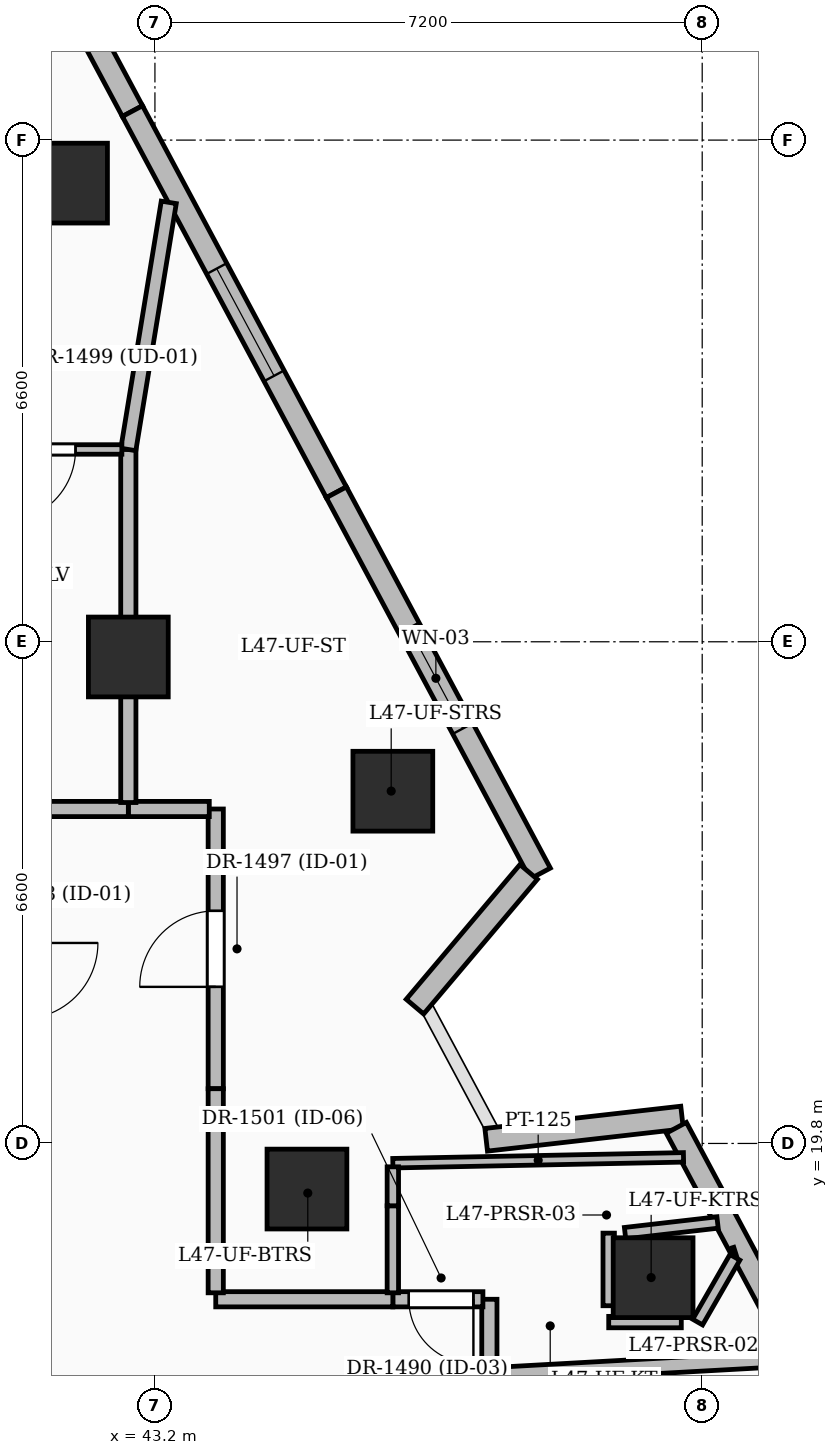
"""IFC4 building model, lengths in metres.
Left out: names, types, materials, properties, quantities, classifications, styles, units other than length and angle.
Written with IfcOpenShell. Run it as: python <this file> out.ifc"""

import sys

from ifc_helpers import new_model, si_unit, direction, frame, frame_2d, origin, origin_2d, place, context, subcontext, project, spatial, rectangle, extrude, element, fill, save


model = new_model("IFC4")
c1 = context("Model", 3, precision=1e-05, world=origin(), true_north=direction((0.0, 1.0)))
c2 = subcontext(c1, "Body", "Model", "MODEL_VIEW")
j1 = project(units=[si_unit("LENGTHUNIT", "METRE"), si_unit("PLANEANGLEUNIT", "RADIAN")], contexts=[c1])
p1 = place(None, origin())
s1 = spatial("IfcSite", under=j1, at=p1, CompositionType="ELEMENT")
p2 = place(p1, origin())
s2 = spatial("IfcBuilding", under=s1, at=p2, CompositionType="ELEMENT")
p3 = place(p2, frame((0.0, 0.0, 182.4)))
s3 = spatial("IfcBuildingStorey", under=s2, at=p3, CompositionType="ELEMENT", Elevation=182.4)
for number, where, z_axis, x_axis in (
    (1, (45.2, 19.2, 0.0), (0.0, 0.0, 1.0), (1.0, 0.0, 0.0)),
    (2, (42.85, 26.2, 0.0), (0.0, 0.0, 1.0), (1.0, 0.0, 0.0)),
    (3, (49.754, 18.034, 0.0), (0.0, 0.0, 1.0), (1.0, 0.0, 0.0)),
    (4, (46.33, 24.434, 0.0), (0.0, 0.0, 1.0), (1.0, 0.0, 0.0)),
    (5, (42.05, 32.434, 0.0), (0.0, 0.0, 1.0), (1.0, 0.0, 0.0)),
):
    element("IfcColumn", number, at=place(p3, frame(where, z_axis=z_axis, x_axis=x_axis)), inside=s3, PredefinedType="COLUMN", context=c2, shape_type="SweptSolid", body=[
        extrude(rectangle(XDim=1.05, YDim=1.05, at=origin_2d()), origin(), (0.0, 0.0, 1.0), 3.6),
    ])
p4 = place(p3, frame((40.497, 37.881, 0.0), z_axis=(0.0, 0.0, 1.0), x_axis=(0.47173271257, -0.881741599274, 0.0)))
e6 = element("IfcWall", 6, at=p4, inside=s3, PredefinedType="SOLIDWALL", context=c2, shape_type="SweptSolid", body=[
    extrude(rectangle(XDim=5.103, YDim=0.3, at=frame_2d((2.551, 0.0))), origin(), (0.0, 0.0, 1.0), 3.35),
])
p5 = place(p4, frame((1.79, 0.0, 0.6)))
e7 = element("IfcOpeningElement", 7, at=p5, cuts=e6, PredefinedType="OPENING", context=c2, shape_type="SweptSolid", body=[
    extrude(rectangle(XDim=1.8, YDim=2.1, at=frame_2d((0.9, 1.05))), frame((0.0, 0.16, 0.0), z_axis=(0.0, -1.0, 0.0), x_axis=(1.0, 0.0, 0.0)), (0.0, 0.0, 1.0), 0.32),
])
p6 = place(p3, frame((42.904, 33.382, 0.0), z_axis=(0.0, 0.0, 1.0), x_axis=(0.4716995968, -0.881759315448, 0.0)))
e8 = element("IfcWall", 8, at=p6, inside=s3, PredefinedType="SOLIDWALL", context=c2, shape_type="SweptSolid", body=[
    extrude(rectangle(XDim=5.688, YDim=0.3, at=frame_2d((2.844, 0.0))), origin(), (0.0, 0.0, 1.0), 3.35),
])
p7 = place(p6, frame((2.35, 0.0, 0.55)))
e9 = element("IfcOpeningElement", 9, at=p7, cuts=e8, PredefinedType="OPENING", context=c2, shape_type="SweptSolid", body=[
    extrude(rectangle(XDim=1.6, YDim=2.2, at=frame_2d((0.8, 1.1))), frame((0.0, 0.16, 0.0), z_axis=(0.0, -1.0, 0.0), x_axis=(1.0, 0.0, 0.0)), (0.0, 0.0, 1.0), 0.32),
])
p8 = place(p3, frame((45.587, 28.366, 0.0), z_axis=(0.0, 0.0, 1.0), x_axis=(0.471750824323, -0.881731909228, 0.0)))
e10 = element("IfcWall", 10, at=p8, inside=s3, PredefinedType="SOLIDWALL", context=c2, shape_type="SweptSolid", body=[
    extrude(rectangle(XDim=5.688, YDim=0.3, at=frame_2d((2.844, 0.0))), origin(), (0.0, 0.0, 1.0), 3.35),
])
p9 = place(p8, frame((2.025, 0.0, 0.6)))
e11 = element("IfcOpeningElement", 11, at=p9, cuts=e10, PredefinedType="OPENING", context=c2, shape_type="SweptSolid", body=[
    extrude(rectangle(XDim=1.5, YDim=2.1, at=frame_2d((0.75, 1.05))), frame((0.0, 0.16, 0.0), z_axis=(0.0, -1.0, 0.0), x_axis=(1.0, 0.0, 0.0)), (0.0, 0.0, 1.0), 0.32),
])
p10 = place(p3, frame((48.117, 23.372, 0.0), z_axis=(0.0, 0.0, 1.0), x_axis=(-0.645234076177, -0.763984938949, 0.0)))
e12 = element("IfcWall", 12, at=p10, inside=s3, PredefinedType="SOLIDWALL", context=c2, shape_type="SweptSolid", body=[
    extrude(rectangle(XDim=2.319, YDim=0.3, at=frame_2d((1.16, 0.0))), origin(), (0.0, 0.0, 1.0), 2.575),
])
p11 = place(p3, frame((47.558, 19.848, 0.0), z_axis=(0.0, 0.0, 1.0), x_axis=(0.993611013473, 0.112859000109, 0.0)))
e13 = element("IfcWall", 13, at=p11, inside=s3, PredefinedType="SOLIDWALL", context=c2, shape_type="SweptSolid", body=[
    extrude(rectangle(XDim=2.594, YDim=0.3, at=frame_2d((1.297, 0.0))), origin(), (0.0, 0.0, 1.0), 2.575),
])
p12 = place(p3, frame((50.06, 20.006, 0.0), z_axis=(0.0, 0.0, 1.0), x_axis=(0.471725656125, -0.881745374444, 0.0)))
e14 = element("IfcWall", 14, at=p12, inside=s3, PredefinedType="SOLIDWALL", context=c2, shape_type="SweptSolid", body=[
    extrude(rectangle(XDim=5.413, YDim=0.3, at=frame_2d((2.706, 0.0))), origin(), (0.0, 0.0, 1.0), 3.35),
])
p13 = place(p3, frame((47.425, 14.2, 0.0), z_axis=(0.0, 0.0, 1.0), x_axis=(0.068484119878, 0.997652206595, 0.0)))
e15 = element("IfcWall", 15, at=p13, inside=s3, PredefinedType="PARTITIONING", context=c2, shape_type="SweptSolid", body=[
    extrude(rectangle(XDim=2.556, YDim=0.2, at=frame_2d((1.278, 0.0))), origin(), (0.0, 0.0, 1.0), 2.464),
])
p14 = place(p13, frame((1.172, 0.0, 0.0)))
e16 = element("IfcOpeningElement", 16, at=p14, cuts=e15, PredefinedType="OPENING", context=c2, shape_type="SweptSolid", body=[
    extrude(rectangle(XDim=0.9, YDim=2.1, at=frame_2d((0.45, 1.05))), frame((0.0, 0.11, 0.0), z_axis=(0.0, -1.0, 0.0), x_axis=(1.0, 0.0, 0.0)), (0.0, 0.0, 1.0), 0.22),
])
p15 = place(p3, frame((44.0, 20.52, 0.0), z_axis=(0.0, 0.0, 1.0), x_axis=(0.0, 1.0, 0.0)))
e17 = element("IfcWall", 17, at=p15, inside=s3, PredefinedType="PARTITIONING", context=c2, shape_type="SweptSolid", body=[
    extrude(rectangle(XDim=3.68, YDim=0.2, at=frame_2d((1.84, 0.0))), origin(), (0.0, 0.0, 1.0), 2.436),
])
p16 = place(p15, frame((1.34, 0.0, 0.0)))
e18 = element("IfcOpeningElement", 18, at=p16, cuts=e17, PredefinedType="OPENING", context=c2, shape_type="SweptSolid", body=[
    extrude(rectangle(XDim=1.0, YDim=2.2, at=frame_2d((0.5, 1.1))), frame((0.0, 0.11, 0.0), z_axis=(0.0, -1.0, 0.0), x_axis=(1.0, 0.0, 0.0)), (0.0, 0.0, 1.0), 0.22),
])
p17 = place(p3, frame((43.915, 24.2, 0.0), z_axis=(0.0, 0.0, 1.0), x_axis=(-1.0, 0.0, 0.0)))
e19 = element("IfcWall", 19, at=p17, inside=s3, PredefinedType="PARTITIONING", context=c2, shape_type="SweptSolid", body=[
    extrude(rectangle(XDim=1.065, YDim=0.2, at=frame_2d((0.532, 0.0))), origin(), (0.0, 0.0, 1.0), 2.436),
])
p18 = place(p3, frame((47.6, 16.75, 0.0), z_axis=(0.0, 0.0, 1.0), x_axis=(0.0, 1.0, 0.0)))
e20 = element("IfcWall", 20, at=p18, inside=s3, PredefinedType="PARTITIONING", context=c2, shape_type="SweptSolid", body=[
    extrude(rectangle(XDim=1.0, YDim=0.2, at=frame_2d((0.5, 0.0))), origin(), (0.0, 0.0, 1.0), 3.01),
])
p19 = place(p3, frame((47.515, 17.75, 0.0), z_axis=(0.0, 0.0, 1.0), x_axis=(-1.0, 0.0, 0.0)))
e21 = element("IfcWall", 21, at=p19, inside=s3, PredefinedType="PARTITIONING", context=c2, shape_type="SweptSolid", body=[
    extrude(rectangle(XDim=1.185, YDim=0.2, at=frame_2d((0.592, 0.0))), origin(), (0.0, 0.0, 1.0), 3.01),
])
p20 = place(p19, frame((0.125, 0.0, 0.0)))
e22 = element("IfcOpeningElement", 22, at=p20, cuts=e21, PredefinedType="OPENING", context=c2, shape_type="SweptSolid", body=[
    extrude(rectangle(XDim=0.85, YDim=2.1, at=frame_2d((0.425, 1.05))), frame((0.0, 0.11, 0.0), z_axis=(0.0, -1.0, 0.0), x_axis=(1.0, 0.0, 0.0)), (0.0, 0.0, 1.0), 0.22),
])
p21 = place(p3, frame((46.33, 17.75, 0.0), z_axis=(0.0, 0.0, 1.0), x_axis=(-1.0, 0.0, 0.0)))
e23 = element("IfcWall", 23, at=p21, inside=s3, PredefinedType="PARTITIONING", context=c2, shape_type="SweptSolid", body=[
    extrude(rectangle(XDim=2.33, YDim=0.2, at=frame_2d((1.165, 0.0))), origin(), (0.0, 0.0, 1.0), 2.436),
])
p22 = place(p3, frame((42.85, 24.2, 0.0), z_axis=(0.0, 0.0, 1.0), x_axis=(-1.0, 0.0, 0.0)))
e24 = element("IfcWall", 24, at=p22, inside=s3, PredefinedType="PARTITIONING", context=c2, shape_type="SweptSolid", body=[
    extrude(rectangle(XDim=1.4, YDim=0.2, at=frame_2d((0.7, 0.0))), origin(), (0.0, 0.0, 1.0), 3.35),
])
p23 = place(p3, frame((51.551, 16.969, 0.0), z_axis=(0.0, 0.0, 1.0), x_axis=(-0.998463068017, -0.055421131396, 0.0)))
e25 = element("IfcWall", 25, at=p23, inside=s3, PredefinedType="PARTITIONING", context=c2, shape_type="SweptSolid", body=[
    extrude(rectangle(XDim=3.872, YDim=0.2, at=frame_2d((1.936, 0.0))), origin(), (0.0, 0.0, 1.0), 2.464),
])
p24 = place(p3, frame((46.33, 19.54, 0.0), z_axis=(0.0, 0.0, 1.0), x_axis=(0.999797833356, 0.020107024038, 0.0)))
e26 = element("IfcWall", 26, at=p24, inside=s3, PredefinedType="PARTITIONING", context=c2, shape_type="SweptSolid", body=[
    extrude(rectangle(XDim=3.825, YDim=0.125, at=frame_2d((1.912, 0.0))), origin(), (0.0, 0.0, 1.0), 2.57),
])
p25 = place(p3, frame((42.85, 28.93, 0.0), z_axis=(0.0, 0.0, 1.0), x_axis=(0.0, -1.0, 0.0)))
e27 = element("IfcWall", 27, at=p25, inside=s3, PredefinedType="PARTITIONING", context=c2, shape_type="SweptSolid", body=[
    extrude(rectangle(XDim=4.645, YDim=0.2, at=frame_2d((2.323, 0.0))), origin(), (0.0, 0.0, 1.0), 2.436),
])
p26 = place(p3, frame((43.382, 32.181, 0.0), z_axis=(0.0, 0.0, 1.0), x_axis=(-0.161489880459, -0.986874368149, 0.0)))
e28 = element("IfcWall", 28, at=p26, inside=s3, PredefinedType="PARTITIONING", context=c2, shape_type="SweptSolid", body=[
    extrude(rectangle(XDim=3.294, YDim=0.2, at=frame_2d((1.647, 0.0))), origin(), (0.0, 0.0, 1.0), 2.57),
])
p27 = place(p3, frame((46.33, 18.98, 0.0), z_axis=(0.0, 0.0, 1.0), x_axis=(0.0, -1.0, 0.0)))
e29 = element("IfcWall", 29, at=p27, inside=s3, PredefinedType="PARTITIONING", context=c2, shape_type="SweptSolid", body=[
    extrude(rectangle(XDim=1.145, YDim=0.15, at=frame_2d((0.573, 0.0))), origin(), (0.0, 0.0, 1.0), 3.01),
])
p28 = place(p3, frame((42.765, 28.93, 0.0), z_axis=(0.0, 0.0, 1.0), x_axis=(-1.0, 0.0, 0.0)))
e30 = element("IfcWall", 30, at=p28, inside=s3, PredefinedType="PARTITIONING", context=c2, shape_type="SweptSolid", body=[
    extrude(rectangle(XDim=2.365, YDim=0.125, at=frame_2d((1.183, 0.0))), origin(), (0.0, 0.0, 1.0), 2.464),
])
p29 = place(p28, frame((0.61, 0.0, 0.0)))
e31 = element("IfcOpeningElement", 31, at=p29, cuts=e30, PredefinedType="OPENING", context=c2, shape_type="SweptSolid", body=[
    extrude(rectangle(XDim=0.95, YDim=2.2, at=frame_2d((0.475, 1.1))), frame((0.0, 0.072, 0.0), z_axis=(0.0, -1.0, 0.0), x_axis=(1.0, 0.0, 0.0)), (0.0, 0.0, 1.0), 0.145),
])
p30 = place(p3, frame((44.0, 17.835, 0.0), z_axis=(0.0, 0.0, 1.0), x_axis=(0.0, 1.0, 0.0)))
e32 = element("IfcWall", 32, at=p30, inside=s3, PredefinedType="PARTITIONING", context=c2, shape_type="SweptSolid", body=[
    extrude(rectangle(XDim=2.685, YDim=0.2, at=frame_2d((1.343, 0.0))), origin(), (0.0, 0.0, 1.0), 3.35),
])
p31 = place(p3, frame((50.838, 18.362, 0.0), z_axis=(0.0, 0.0, 1.0), x_axis=(-0.95112480189, -0.30880675386, 0.0)))
e33 = element("IfcWall", 33, at=p31, inside=s3, PredefinedType="PARTITIONING", context=c2, shape_type="SweptSolid", body=[
    extrude(rectangle(XDim=0.02, YDim=0.15, at=frame_2d((0.01, 0.0))), origin(), (0.0, 0.0, 1.0), 3.35),
])
p32 = place(p3, frame((50.83, 18.302, 0.0), z_axis=(0.0, 0.0, 1.0), x_axis=(-0.498517791367, -0.866879467798, 0.0)))
e34 = element("IfcWall", 34, at=p32, inside=s3, PredefinedType="PARTITIONING", context=c2, shape_type="SweptSolid", body=[
    extrude(rectangle(XDim=0.983, YDim=0.15, at=frame_2d((0.491, 0.0))), origin(), (0.0, 0.0, 1.0), 2.57),
])
for number, where, z_axis, x_axis in (
    (35, (50.125, 17.45, 0.0), (0.0, 0.0, 1.0), (-1.0, 0.0, 0.0)),
    (36, (49.17, 17.665, 0.0), (0.0, 0.0, 1.0), (0.0, 1.0, 0.0)),
):
    element("IfcWall", number, at=place(p3, frame(where, z_axis=z_axis, x_axis=x_axis)), inside=s3, PredefinedType="PARTITIONING", context=c2, shape_type="SweptSolid", body=[
        extrude(rectangle(XDim=0.955, YDim=0.15, at=frame_2d((0.478, 0.0))), origin(), (0.0, 0.0, 1.0), 2.464),
    ])
p33 = place(p3, frame((49.385, 18.62, 0.0), z_axis=(0.0, 0.0, 1.0), x_axis=(0.993458591967, 0.11419293344, 0.0)))
e37 = element("IfcWall", 37, at=p33, inside=s3, PredefinedType="PARTITIONING", context=c2, shape_type="SweptSolid", body=[
    extrude(rectangle(XDim=1.225, YDim=0.15, at=frame_2d((0.613, 0.0))), origin(), (0.0, 0.0, 1.0), 2.57),
])
p34 = place(p3, frame((46.33, 19.492, 0.0), z_axis=(0.0, 0.0, 1.0), x_axis=(0.0, -1.0, 0.0)))
e38 = element("IfcWall", 38, at=p34, inside=s3, PredefinedType="PARTITIONING", context=c2, shape_type="SweptSolid", body=[
    extrude(rectangle(XDim=0.512, YDim=0.15, at=frame_2d((0.256, 0.0))), origin(), (0.0, 0.0, 1.0), 3.01),
])
p35 = place(p7, origin())
e39 = element("IfcWindow", 39, at=p35, inside=s3, PartitioningType="SINGLE_PANEL", PredefinedType="WINDOW", context=c2, shape_type="SweptSolid", body=[
    extrude(rectangle(XDim=1.6, YDim=2.2, at=frame_2d((0.8, 1.1))), frame((0.0, 0.03, 0.0), z_axis=(0.0, -1.0, 0.0), x_axis=(1.0, 0.0, 0.0)), (0.0, 0.0, 1.0), 0.06),
])
fill(e9, e39)
p36 = place(p9, origin())
e40 = element("IfcWindow", 40, at=p36, inside=s3, PartitioningType="SINGLE_PANEL", PredefinedType="WINDOW", context=c2, shape_type="SweptSolid", body=[
    extrude(rectangle(XDim=1.5, YDim=2.1, at=frame_2d((0.75, 1.05))), frame((0.0, 0.03, 0.0), z_axis=(0.0, -1.0, 0.0), x_axis=(1.0, 0.0, 0.0)), (0.0, 0.0, 1.0), 0.06),
])
fill(e11, e40)
p37 = place(p16, origin())
e41 = element("IfcDoor", 41, at=p37, inside=s3, OperationType="SINGLE_SWING_LEFT", PredefinedType="DOOR", context=c2, shape_type="SweptSolid", body=[
    extrude(rectangle(XDim=1.0, YDim=2.2, at=frame_2d((0.5, 1.1))), frame((0.0, 0.025, 0.0), z_axis=(0.0, -1.0, 0.0), x_axis=(1.0, 0.0, 0.0)), (0.0, 0.0, 1.0), 0.05),
])
fill(e18, e41)
p38 = place(p29, origin())
e42 = element("IfcDoor", 42, at=p38, inside=s3, OperationType="SINGLE_SWING_RIGHT", PredefinedType="DOOR", context=c2, shape_type="SweptSolid", body=[
    extrude(rectangle(XDim=0.95, YDim=2.2, at=frame_2d((0.475, 1.1))), frame((0.0, 0.025, 0.0), z_axis=(0.0, -1.0, 0.0), x_axis=(1.0, 0.0, 0.0)), (0.0, 0.0, 1.0), 0.05),
])
fill(e31, e42)
p39 = place(p20, origin())
e43 = element("IfcDoor", 43, at=p39, inside=s3, OperationType="SINGLE_SWING_LEFT", PredefinedType="DOOR", context=c2, shape_type="SweptSolid", body=[
    extrude(rectangle(XDim=0.85, YDim=2.1, at=frame_2d((0.425, 1.05))), frame((0.0, 0.025, 0.0), z_axis=(0.0, -1.0, 0.0), x_axis=(1.0, 0.0, 0.0)), (0.0, 0.0, 1.0), 0.05),
])
fill(e22, e43)
save(model, sys.argv[1])
